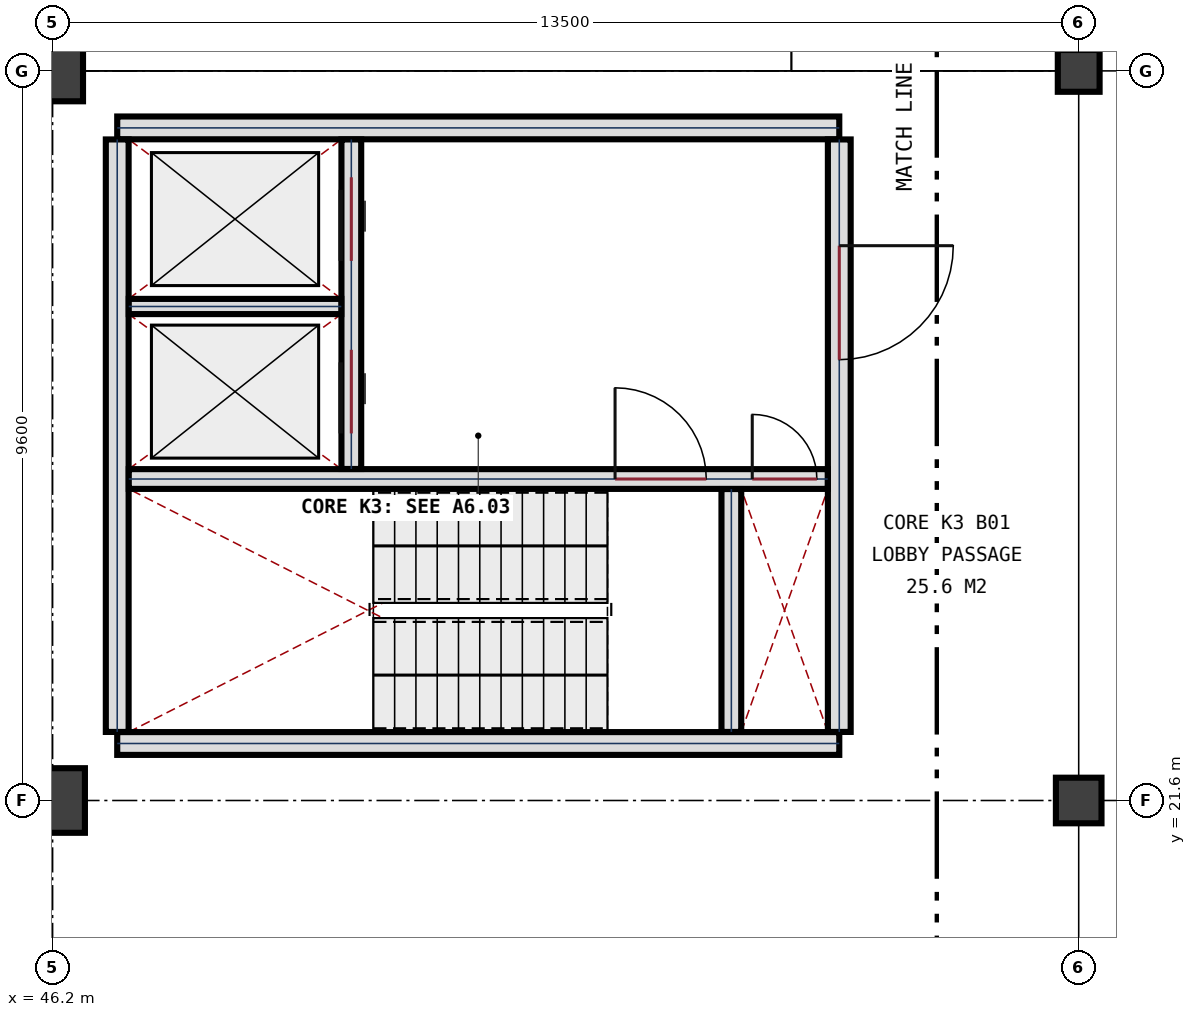
"""IFC4 building model, lengths in metres.
Left out: names, types, materials, properties, quantities, classifications, styles, units other than length and angle.
Written with IfcOpenShell. Run it as: python <this file> out.ifc"""

import sys

from ifc_helpers import new_model, si_unit, direction, frame, frame_2d, origin, origin_2d, place, context, subcontext, project, spatial, rectangle, extrude, element, fill, save


model = new_model("IFC4")
c1 = context("Model", 3, precision=1e-05, world=origin(), true_north=direction((0.0, 1.0)))
c2 = subcontext(c1, "Body", "Model", "MODEL_VIEW")
j1 = project(units=[si_unit("LENGTHUNIT", "METRE"), si_unit("PLANEANGLEUNIT", "RADIAN")], contexts=[c1])
p1 = place(None, origin())
s1 = spatial("IfcSite", under=j1, at=p1, CompositionType="ELEMENT")
p2 = place(p1, origin())
s2 = spatial("IfcBuilding", under=s1, at=p2, CompositionType="ELEMENT")
p3 = place(p2, frame((0.0, 0.0, -4.2)))
s3 = spatial("IfcBuildingStorey", under=s2, at=p3, CompositionType="ELEMENT", Elevation=-4.2)
p4 = place(p3, frame((46.2, 21.6, 0.0), z_axis=(0.0, 0.0, 1.0), x_axis=(1.0, 0.0, 0.0)))
e1 = element("IfcColumn", 1, at=p4, inside=s3, PredefinedType="COLUMN", context=c2, shape_type="SweptSolid", body=[
    extrude(rectangle(XDim=0.85, YDim=0.85, at=origin_2d()), origin(), (0.0, 0.0, 1.0), 4.2),
])
p5 = place(p3, frame((46.2, 31.2, 0.0), z_axis=(0.0, 0.0, 1.0), x_axis=(1.0, 0.0, 0.0)))
e2 = element("IfcColumn", 2, at=p5, inside=s3, PredefinedType="COLUMN", context=c2, shape_type="SweptSolid", body=[
    extrude(rectangle(XDim=0.8, YDim=0.8, at=origin_2d()), origin(), (0.0, 0.0, 1.0), 4.2),
])
p6 = place(p3, frame((59.7, 21.6, 0.0), z_axis=(0.0, 0.0, 1.0), x_axis=(1.0, 0.0, 0.0)))
e3 = element("IfcColumn", 3, at=p6, inside=s3, PredefinedType="COLUMN", context=c2, shape_type="SweptSolid", body=[
    extrude(rectangle(XDim=0.6, YDim=0.6, at=origin_2d()), origin(), (0.0, 0.0, 1.0), 4.2),
])
p7 = place(p3, frame((59.7, 31.2, 0.0), z_axis=(0.0, 0.0, 1.0), x_axis=(1.0, 0.0, 0.0)))
e4 = element("IfcColumn", 4, at=p7, inside=s3, PredefinedType="COLUMN", context=c2, shape_type="SweptSolid", body=[
    extrude(rectangle(XDim=0.55, YDim=0.55, at=origin_2d()), origin(), (0.0, 0.0, 1.0), 4.2),
])
for number, where, z_axis, x_axis in (
    (5, (56.55, 22.35, 0.0), (0.0, 0.0, 1.0), (-1.0, 0.0, 0.0)),
    (6, (47.05, 30.45, 0.0), (0.0, 0.0, 1.0), (1.0, 0.0, 0.0)),
):
    element("IfcWall", number, at=place(p3, frame(where, z_axis=z_axis, x_axis=x_axis)), inside=s3, PredefinedType="SHEAR", context=c2, shape_type="SweptSolid", body=[
        extrude(rectangle(XDim=9.5, YDim=0.3, at=frame_2d((4.75, 0.0))), origin(), (0.0, 0.0, 1.0), 4.2),
    ])
p8 = place(p3, frame((47.05, 22.502, 0.0), z_axis=(0.0, 0.0, 1.0), x_axis=(0.0, 1.0, 0.0)))
e7 = element("IfcWall", 7, at=p8, inside=s3, PredefinedType="SHEAR", context=c2, shape_type="SweptSolid", body=[
    extrude(rectangle(XDim=7.796, YDim=0.3, at=frame_2d((3.898, 0.0))), origin(), (0.0, 0.0, 1.0), 4.2),
])
p9 = place(p3, frame((56.55, 30.298, 0.0), z_axis=(0.0, 0.0, 1.0), x_axis=(0.0, -1.0, 0.0)))
e8 = element("IfcWall", 8, at=p9, inside=s3, PredefinedType="SHEAR", context=c2, shape_type="SweptSolid", body=[
    extrude(rectangle(XDim=7.796, YDim=0.3, at=frame_2d((3.898, 0.0))), origin(), (0.0, 0.0, 1.0), 4.2),
])
p10 = place(p9, frame((1.398, 0.0, 0.0)))
e9 = element("IfcOpeningElement", 9, at=p10, cuts=e8, PredefinedType="OPENING", context=c2, shape_type="SweptSolid", body=[
    extrude(rectangle(XDim=1.5, YDim=2.25, at=frame_2d((0.75, 1.125))), frame((0.0, 0.16, 0.0), z_axis=(0.0, -1.0, 0.0), x_axis=(1.0, 0.0, 0.0)), (0.0, 0.0, 1.0), 0.32),
])
p11 = place(p3, frame((47.202, 25.83, 0.0), z_axis=(0.0, 0.0, 1.0), x_axis=(1.0, 0.0, 0.0)))
e10 = element("IfcWall", 10, at=p11, inside=s3, PredefinedType="SHEAR", context=c2, shape_type="SweptSolid", body=[
    extrude(rectangle(XDim=9.196, YDim=0.26, at=frame_2d((4.598, 0.0))), origin(), (0.0, 0.0, 1.0), 4.2),
])
p12 = place(p11, frame((6.398, 0.0, 0.0)))
e11 = element("IfcOpeningElement", 11, at=p12, cuts=e10, PredefinedType="OPENING", context=c2, shape_type="SweptSolid", body=[
    extrude(rectangle(XDim=1.2, YDim=2.2, at=frame_2d((0.6, 1.1))), frame((0.0, 0.14, 0.0), z_axis=(0.0, -1.0, 0.0), x_axis=(1.0, 0.0, 0.0)), (0.0, 0.0, 1.0), 0.28),
])
p13 = place(p11, frame((8.203, 0.0, 0.0)))
e12 = element("IfcOpeningElement", 12, at=p13, cuts=e10, PredefinedType="OPENING", context=c2, shape_type="SweptSolid", body=[
    extrude(rectangle(XDim=0.85, YDim=2.05, at=frame_2d((0.425, 1.025))), frame((0.0, 0.14, 0.0), z_axis=(0.0, -1.0, 0.0), x_axis=(1.0, 0.0, 0.0)), (0.0, 0.0, 1.0), 0.28),
])
p14 = place(p3, frame((55.13, 22.502, 0.0), z_axis=(0.0, 0.0, 1.0), x_axis=(0.0, 1.0, 0.0)))
e13 = element("IfcWall", 13, at=p14, inside=s3, PredefinedType="SHEAR", context=c2, shape_type="SweptSolid", body=[
    extrude(rectangle(XDim=3.196, YDim=0.26, at=frame_2d((1.598, 0.0))), origin(), (0.0, 0.0, 1.0), 4.2),
])
p15 = place(p3, frame((50.13, 25.962, 0.0), z_axis=(0.0, 0.0, 1.0), x_axis=(0.0, 1.0, 0.0)))
e14 = element("IfcWall", 14, at=p15, inside=s3, PredefinedType="SHEAR", context=c2, shape_type="SweptSolid", body=[
    extrude(rectangle(XDim=4.336, YDim=0.26, at=frame_2d((2.168, 0.0))), origin(), (0.0, 0.0, 1.0), 4.2),
])
p16 = place(p15, frame((0.468, 0.0, 0.0)))
e15 = element("IfcOpeningElement", 15, at=p16, cuts=e14, PredefinedType="OPENING", context=c2, shape_type="SweptSolid", body=[
    extrude(rectangle(XDim=1.1, YDim=2.15, at=frame_2d((0.55, 1.075))), frame((0.0, 0.14, 0.0), z_axis=(0.0, -1.0, 0.0), x_axis=(1.0, 0.0, 0.0)), (0.0, 0.0, 1.0), 0.28),
])
p17 = place(p15, frame((2.738, 0.0, 0.0)))
e16 = element("IfcOpeningElement", 16, at=p17, cuts=e14, PredefinedType="OPENING", context=c2, shape_type="SweptSolid", body=[
    extrude(rectangle(XDim=1.1, YDim=2.15, at=frame_2d((0.55, 1.075))), frame((0.0, 0.14, 0.0), z_axis=(0.0, -1.0, 0.0), x_axis=(1.0, 0.0, 0.0)), (0.0, 0.0, 1.0), 0.28),
])
p18 = place(p3, frame((47.202, 28.1, 0.0), z_axis=(0.0, 0.0, 1.0), x_axis=(1.0, 0.0, 0.0)))
e17 = element("IfcWall", 17, at=p18, inside=s3, PredefinedType="PLUMBINGWALL", context=c2, shape_type="SweptSolid", body=[
    extrude(rectangle(XDim=2.796, YDim=0.2, at=frame_2d((1.398, 0.0))), origin(), (0.0, 0.0, 1.0), 3.86),
])
p19 = place(p10, origin())
e18 = element("IfcDoor", 18, at=p19, inside=s3, OperationType="SINGLE_SWING_LEFT", PredefinedType="DOOR", context=c2, shape_type="SweptSolid", body=[
    extrude(rectangle(XDim=1.5, YDim=2.25, at=frame_2d((0.75, 1.125))), frame((0.0, 0.032, 0.0), z_axis=(0.0, -1.0, 0.0), x_axis=(1.0, 0.0, 0.0)), (0.0, 0.0, 1.0), 0.065),
])
fill(e9, e18)
p20 = place(p12, origin())
e19 = element("IfcDoor", 19, at=p20, inside=s3, OperationType="SINGLE_SWING_LEFT", PredefinedType="DOOR", context=c2, shape_type="SweptSolid", body=[
    extrude(rectangle(XDim=1.2, YDim=2.2, at=frame_2d((0.6, 1.1))), frame((0.0, 0.032, 0.0), z_axis=(0.0, -1.0, 0.0), x_axis=(1.0, 0.0, 0.0)), (0.0, 0.0, 1.0), 0.065),
])
fill(e11, e19)
p21 = place(p13, origin())
e20 = element("IfcDoor", 20, at=p21, inside=s3, OperationType="SINGLE_SWING_LEFT", PredefinedType="DOOR", context=c2, shape_type="SweptSolid", body=[
    extrude(rectangle(XDim=0.85, YDim=2.05, at=frame_2d((0.425, 1.025))), frame((0.0, 0.032, 0.0), z_axis=(0.0, -1.0, 0.0), x_axis=(1.0, 0.0, 0.0)), (0.0, 0.0, 1.0), 0.065),
])
fill(e12, e20)
p22 = place(p16, origin())
e21 = element("IfcDoor", 21, at=p22, inside=s3, OperationType="SLIDING_TO_LEFT", PredefinedType="DOOR", context=c2, shape_type="SweptSolid", body=[
    extrude(rectangle(XDim=1.1, YDim=2.15, at=frame_2d((0.55, 1.075))), frame((0.0, 0.032, 0.0), z_axis=(0.0, -1.0, 0.0), x_axis=(1.0, 0.0, 0.0)), (0.0, 0.0, 1.0), 0.065),
])
fill(e15, e21)
p23 = place(p17, origin())
e22 = element("IfcDoor", 22, at=p23, inside=s3, OperationType="SLIDING_TO_LEFT", PredefinedType="DOOR", context=c2, shape_type="SweptSolid", body=[
    extrude(rectangle(XDim=1.1, YDim=2.15, at=frame_2d((0.55, 1.075))), frame((0.0, 0.032, 0.0), z_axis=(0.0, -1.0, 0.0), x_axis=(1.0, 0.0, 0.0)), (0.0, 0.0, 1.0), 0.065),
])
fill(e16, e22)
save(model, sys.argv[1])
